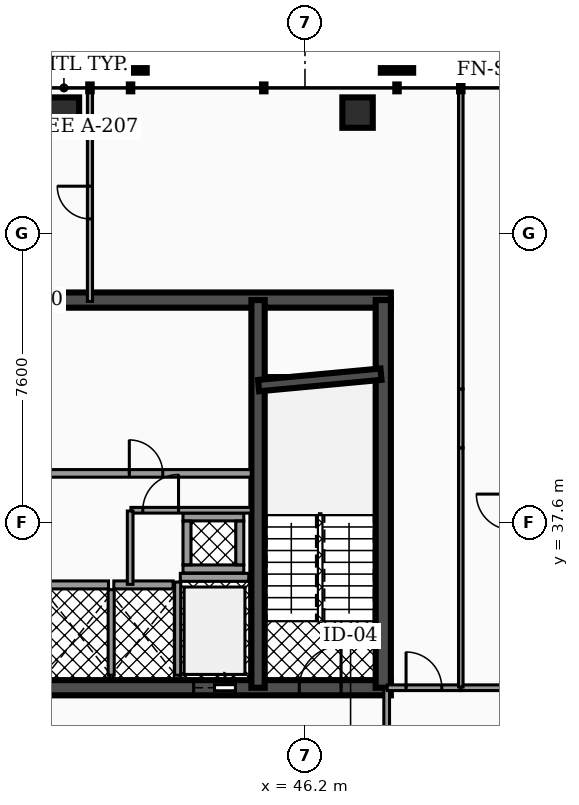
"""IFC4 building model, lengths in metres.
Left out: names, types, materials, properties, quantities, classifications, styles, units other than length and angle.
Written with IfcOpenShell. Run it as: python <this file> out.ifc"""

import sys

from ifc_helpers import new_model, si_unit, direction, frame, frame_2d, origin, origin_2d, place, context, subcontext, project, spatial, rectangle, hollow_rectangle, extrude, element, fill, save


model = new_model("IFC4")
c1 = context("Model", 3, precision=1e-05, world=origin(), true_north=direction((0.0, 1.0)))
c2 = subcontext(c1, "Body", "Model", "MODEL_VIEW")
j1 = project(units=[si_unit("LENGTHUNIT", "METRE"), si_unit("PLANEANGLEUNIT", "RADIAN")], contexts=[c1])
p1 = place(None, origin())
s1 = spatial("IfcSite", under=j1, at=p1, CompositionType="ELEMENT")
p2 = place(p1, origin())
s2 = spatial("IfcBuilding", under=s1, at=p2, CompositionType="ELEMENT")
p3 = place(p2, frame((0.0, 0.0, 153.34)))
s3 = spatial("IfcBuildingStorey", under=s2, at=p3, CompositionType="ELEMENT", Elevation=153.34)
p4 = place(p3, frame((28.4, 43.45, 0.0), z_axis=(0.0, 0.0, 1.0), x_axis=(1.0, 0.0, 0.0)))
e1 = element("IfcWall", 1, at=p4, inside=s3, PredefinedType="SHEAR", context=c2, shape_type="SweptSolid", body=[
    extrude(rectangle(XDim=20.06, YDim=0.4, at=frame_2d((10.03, 0.0))), origin(), (0.0, 0.0, 1.0), 3.5),
])
p5 = place(p3, frame((28.4, 33.25, 0.0), z_axis=(0.0, 0.0, 1.0), x_axis=(1.0, 0.0, 0.0)))
e2 = element("IfcWall", 2, at=p5, inside=s3, PredefinedType="SHEAR", context=c2, shape_type="SweptSolid", body=[
    extrude(rectangle(XDim=20.06, YDim=0.4, at=frame_2d((10.03, 0.0))), origin(), (0.0, 0.0, 1.0), 3.5),
])
p6 = place(p5, frame((4.03, 0.0, 0.0)))
e3 = element("IfcOpeningElement", 3, at=p6, cuts=e2, PredefinedType="OPENING", context=c2, shape_type="SweptSolid", body=[
    extrude(rectangle(XDim=1.1, YDim=2.15, at=frame_2d((0.55, 1.075))), frame((0.0, 0.21, 0.0), z_axis=(0.0, -1.0, 0.0), x_axis=(1.0, 0.0, 0.0)), (0.0, 0.0, 1.0), 0.42),
])
p7 = place(p5, frame((14.87, 0.0, 0.0)))
e4 = element("IfcOpeningElement", 4, at=p7, cuts=e2, PredefinedType="OPENING", context=c2, shape_type="SweptSolid", body=[
    extrude(rectangle(XDim=1.1, YDim=2.15, at=frame_2d((0.55, 1.075))), frame((0.0, 0.21, 0.0), z_axis=(0.0, -1.0, 0.0), x_axis=(1.0, 0.0, 0.0)), (0.0, 0.0, 1.0), 0.42),
])
p8 = place(p5, frame((5.95, 0.0, 0.0)))
e5 = element("IfcOpeningElement", 5, at=p8, cuts=e2, PredefinedType="OPENING", context=c2, shape_type="SweptSolid", body=[
    extrude(rectangle(XDim=1.0, YDim=2.1, at=frame_2d((0.5, 1.05))), frame((0.0, 0.21, 0.0), z_axis=(0.0, -1.0, 0.0), x_axis=(1.0, 0.0, 0.0)), (0.0, 0.0, 1.0), 0.42),
])
p9 = place(p5, frame((7.65, 0.0, 0.0)))
e6 = element("IfcOpeningElement", 6, at=p9, cuts=e2, PredefinedType="OPENING", context=c2, shape_type="SweptSolid", body=[
    extrude(rectangle(XDim=1.0, YDim=2.1, at=frame_2d((0.5, 1.05))), frame((0.0, 0.21, 0.0), z_axis=(0.0, -1.0, 0.0), x_axis=(1.0, 0.0, 0.0)), (0.0, 0.0, 1.0), 0.42),
])
p10 = place(p5, frame((1.31, 0.0, 0.0)))
e7 = element("IfcOpeningElement", 7, at=p10, cuts=e2, PredefinedType="OPENING", context=c2, shape_type="SweptSolid", body=[
    extrude(rectangle(XDim=1.1, YDim=2.2, at=frame_2d((0.55, 1.1))), frame((0.0, 0.21, 0.0), z_axis=(0.0, -1.0, 0.0), x_axis=(1.0, 0.0, 0.0)), (0.0, 0.0, 1.0), 0.42),
])
p11 = place(p5, frame((9.44, 0.0, 0.0)))
e8 = element("IfcOpeningElement", 8, at=p11, cuts=e2, PredefinedType="OPENING", context=c2, shape_type="SweptSolid", body=[
    extrude(rectangle(XDim=1.12, YDim=2.05, at=frame_2d((0.56, 1.025))), frame((0.0, 0.21, 0.0), z_axis=(0.0, -1.0, 0.0), x_axis=(1.0, 0.0, 0.0)), (0.0, 0.0, 1.0), 0.42),
])
p12 = place(p5, frame((17.65, 0.0, 0.0)))
e9 = element("IfcOpeningElement", 9, at=p12, cuts=e2, PredefinedType="OPENING", context=c2, shape_type="SweptSolid", body=[
    extrude(rectangle(XDim=1.1, YDim=2.2, at=frame_2d((0.55, 1.1))), frame((0.0, 0.21, 0.0), z_axis=(0.0, -1.0, 0.0), x_axis=(1.0, 0.0, 0.0)), (0.0, 0.0, 1.0), 0.42),
])
p13 = place(p3, frame((44.965, 33.25, 0.0), z_axis=(0.0, 0.0, 1.0), x_axis=(0.0, 1.0, 0.0)))
e10 = element("IfcWall", 10, at=p13, inside=s3, PredefinedType="SHEAR", context=c2, shape_type="SweptSolid", body=[
    extrude(rectangle(XDim=10.2, YDim=0.35, at=frame_2d((5.1, 0.0))), origin(), (0.0, 0.0, 1.0), 3.5),
])
p14 = place(p3, frame((48.26, 33.25, 0.0), z_axis=(0.0, 0.0, 1.0), x_axis=(0.0, 1.0, 0.0)))
e11 = element("IfcWall", 11, at=p14, inside=s3, PredefinedType="SHEAR", context=c2, shape_type="SweptSolid", body=[
    extrude(rectangle(XDim=10.2, YDim=0.4, at=frame_2d((5.1, 0.0))), origin(), (0.0, 0.0, 1.0), 3.5),
])
p15 = place(p3, frame((44.98, 41.2, 0.0), z_axis=(0.0, 0.0, 1.0), x_axis=(0.995686468965, 0.09278176286, 0.0)))
e12 = element("IfcWall", 12, at=p15, inside=s3, PredefinedType="SHEAR", context=c2, shape_type="SweptSolid", body=[
    extrude(rectangle(XDim=3.234, YDim=0.3, at=frame_2d((1.617, 0.0))), origin(), (0.0, 0.0, 1.0), 3.5),
])
p16 = place(p3, frame((47.583, 48.383, 0.0), z_axis=(0.057932366005, -0.033363458976, 0.997762857885), x_axis=(0.499059487101, 0.866567728648, 0.0)))
e13 = element("IfcColumn", 13, at=p16, inside=s3, PredefinedType="COLUMN", context=c2, shape_type="SweptSolid", body=[
    extrude(hollow_rectangle(XDim=0.8, YDim=0.8, WallThickness=0.04, at=origin_2d()), origin(), (0.0, 0.0, 1.0), 3.498),
])
p17 = place(p3, frame((39.857, 48.383, 0.0), z_axis=(-0.007830290744, -0.033418562283, 0.999410769525), x_axis=(0.973630450451, -0.228130984206, 0.0)))
e14 = element("IfcColumn", 14, at=p17, inside=s3, PredefinedType="COLUMN", context=c2, shape_type="SweptSolid", body=[
    extrude(hollow_rectangle(XDim=0.8, YDim=0.8, WallThickness=0.04, at=origin_2d()), origin(), (0.0, 0.0, 1.0), 3.492),
])
p18 = place(p3, frame((42.92, 36.155, 0.0), z_axis=(0.0, 0.0, 1.0), x_axis=(1.0, 0.0, 0.0)))
e15 = element("IfcWall", 15, at=p18, inside=s3, PredefinedType="SOLIDWALL", context=c2, shape_type="SweptSolid", body=[
    extrude(rectangle(XDim=1.8, YDim=0.21, at=frame_2d((0.9, 0.0))), origin(), (0.0, 0.0, 1.0), 2.472),
])
p19 = place(p3, frame((42.85, 33.58, 0.0), z_axis=(0.0, 0.0, 1.0), x_axis=(0.0, 1.0, 0.0)))
e16 = element("IfcWall", 16, at=p19, inside=s3, PredefinedType="SOLIDWALL", context=c2, shape_type="SweptSolid", body=[
    extrude(rectangle(XDim=2.45, YDim=0.16, at=frame_2d((1.225, 0.0))), origin(), (0.0, 0.0, 1.0), 2.472),
])
p20 = place(p3, frame((39.47, 35.955, 0.0), z_axis=(0.0, 0.0, 1.0), x_axis=(1.0, 0.0, 0.0)))
e17 = element("IfcWall", 17, at=p20, inside=s3, PredefinedType="SOLIDWALL", context=c2, shape_type="SweptSolid", body=[
    extrude(rectangle(XDim=1.56, YDim=0.21, at=frame_2d((0.78, 0.0))), origin(), (0.0, 0.0, 1.0), 2.472),
])
p21 = place(p3, frame((41.1, 33.58, 0.0), z_axis=(0.0, 0.0, 1.0), x_axis=(0.0, 1.0, 0.0)))
e18 = element("IfcWall", 18, at=p21, inside=s3, PredefinedType="SOLIDWALL", context=c2, shape_type="SweptSolid", body=[
    extrude(rectangle(XDim=2.25, YDim=0.16, at=frame_2d((1.125, 0.0))), origin(), (0.0, 0.0, 1.0), 2.472),
])
p22 = place(p3, frame((41.17, 35.955, 0.0), z_axis=(0.0, 0.0, 1.0), x_axis=(1.0, 0.0, 0.0)))
e19 = element("IfcWall", 19, at=p22, inside=s3, PredefinedType="SOLIDWALL", context=c2, shape_type="SweptSolid", body=[
    extrude(rectangle(XDim=1.56, YDim=0.21, at=frame_2d((0.78, 0.0))), origin(), (0.0, 0.0, 1.0), 2.472),
])
for number, where, z_axis, x_axis in (
    (20, (42.99, 36.375, 0.0), (0.0, 0.0, 1.0), (1.0, 0.0, 0.0)),
    (21, (42.99, 37.745, 0.0), (0.0, 0.0, 1.0), (1.0, 0.0, 0.0)),
):
    element("IfcWall", number, at=place(p3, frame(where, z_axis=z_axis, x_axis=x_axis)), inside=s3, PredefinedType="SOLIDWALL", context=c2, shape_type="SweptSolid", body=[
        extrude(rectangle(XDim=1.6, YDim=0.21, at=frame_2d((0.8, 0.0))), origin(), (0.0, 0.0, 1.0), 3.5),
    ])
for number, where, z_axis, x_axis in (
    (22, (43.095, 36.485, 0.0), (0.0, 0.0, 1.0), (0.0, 1.0, 0.0)),
    (23, (44.485, 36.485, 0.0), (0.0, 0.0, 1.0), (0.0, 1.0, 0.0)),
):
    element("IfcWall", number, at=place(p3, frame(where, z_axis=z_axis, x_axis=x_axis)), inside=s3, PredefinedType="SOLIDWALL", context=c2, shape_type="SweptSolid", body=[
        extrude(rectangle(XDim=1.15, YDim=0.21, at=frame_2d((0.575, 0.0))), origin(), (0.0, 0.0, 1.0), 3.5),
    ])
p23 = place(p3, frame((39.25, 38.89, 0.0), z_axis=(0.0, 0.0, 1.0), x_axis=(1.0, 0.0, 0.0)))
e24 = element("IfcWall", 24, at=p23, inside=s3, PredefinedType="PARTITIONING", context=c2, shape_type="SweptSolid", body=[
    extrude(rectangle(XDim=5.535, YDim=0.2, at=frame_2d((2.768, 0.0))), origin(), (0.0, 0.0, 1.0), 2.447),
])
p24 = place(p23, frame((2.327, 0.0, 0.0)))
e25 = element("IfcOpeningElement", 25, at=p24, cuts=e24, PredefinedType="OPENING", context=c2, shape_type="SweptSolid", body=[
    extrude(rectangle(XDim=0.88, YDim=2.05, at=frame_2d((0.44, 1.025))), frame((0.0, 0.11, 0.0), z_axis=(0.0, -1.0, 0.0), x_axis=(1.0, 0.0, 0.0)), (0.0, 0.0, 1.0), 0.22),
])
p25 = place(p3, frame((41.62, 37.92, 0.0), z_axis=(0.0, 0.0, 1.0), x_axis=(1.0, 0.0, 0.0)))
e26 = element("IfcWall", 26, at=p25, inside=s3, PredefinedType="PARTITIONING", context=c2, shape_type="SweptSolid", body=[
    extrude(rectangle(XDim=3.165, YDim=0.15, at=frame_2d((1.583, 0.0))), origin(), (0.0, 0.0, 1.0), 2.447),
])
p26 = place(p25, frame((0.312, 0.0, 0.0)))
e27 = element("IfcOpeningElement", 27, at=p26, cuts=e26, PredefinedType="OPENING", context=c2, shape_type="SweptSolid", body=[
    extrude(rectangle(XDim=0.94, YDim=2.05, at=frame_2d((0.47, 1.025))), frame((0.0, 0.085, 0.0), z_axis=(0.0, -1.0, 0.0), x_axis=(1.0, 0.0, 0.0)), (0.0, 0.0, 1.0), 0.17),
])
p27 = place(p3, frame((41.6, 35.97, 0.0), z_axis=(0.0, 0.0, 1.0), x_axis=(0.0, 1.0, 0.0)))
e28 = element("IfcWall", 28, at=p27, inside=s3, PredefinedType="PARTITIONING", context=c2, shape_type="SweptSolid", body=[
    extrude(rectangle(XDim=1.93, YDim=0.15, at=frame_2d((0.965, 0.0))), origin(), (0.0, 0.0, 1.0), 2.447),
])
p28 = place(p3, frame((48.35, 30.17, 0.0), z_axis=(0.0, 0.0, 1.0), x_axis=(0.0, 1.0, 0.0)))
e29 = element("IfcWall", 29, at=p28, inside=s3, PredefinedType="PARTITIONING", context=c2, shape_type="SweptSolid", body=[
    extrude(rectangle(XDim=3.06, YDim=0.15, at=frame_2d((1.53, 0.0))), origin(), (0.0, 0.0, 1.0), 2.447),
])
p29 = place(p28, frame((1.06, 0.0, 0.0)))
e30 = element("IfcOpeningElement", 30, at=p29, cuts=e29, PredefinedType="OPENING", context=c2, shape_type="SweptSolid", body=[
    extrude(rectangle(XDim=0.94, YDim=2.05, at=frame_2d((0.47, 1.025))), frame((0.0, 0.085, 0.0), z_axis=(0.0, -1.0, 0.0), x_axis=(1.0, 0.0, 0.0)), (0.0, 0.0, 1.0), 0.17),
])
p30 = place(p3, frame((50.305, 33.25, 0.0), z_axis=(0.0, 0.0, 1.0), x_axis=(1.0, 0.0, 0.0)))
e31 = element("IfcWall", 31, at=p30, inside=s3, PredefinedType="PARTITIONING", context=c2, shape_type="SweptSolid", body=[
    extrude(rectangle(XDim=1.325, YDim=0.15, at=frame_2d((0.663, 0.0))), origin(), (0.0, 0.0, 1.0), 2.447),
])
p31 = place(p3, frame((48.365, 33.25, 0.0), z_axis=(0.0, 0.0, 1.0), x_axis=(1.0, 0.0, 0.0)))
e32 = element("IfcWall", 32, at=p31, inside=s3, PredefinedType="PARTITIONING", context=c2, shape_type="SweptSolid", body=[
    extrude(rectangle(XDim=1.93, YDim=0.15, at=frame_2d((0.965, 0.0))), origin(), (0.0, 0.0, 1.0), 2.447),
])
p32 = place(p31, frame((0.495, 0.0, 0.0)))
e33 = element("IfcOpeningElement", 33, at=p32, cuts=e32, PredefinedType="OPENING", context=c2, shape_type="SweptSolid", body=[
    extrude(rectangle(XDim=0.94, YDim=2.05, at=frame_2d((0.47, 1.025))), frame((0.0, 0.085, 0.0), z_axis=(0.0, -1.0, 0.0), x_axis=(1.0, 0.0, 0.0)), (0.0, 0.0, 1.0), 0.17),
])
p33 = place(p3, frame((50.3, 33.27, 0.0), z_axis=(0.0, 0.0, 1.0), x_axis=(0.0, 1.0, 0.0)))
e34 = element("IfcWall", 34, at=p33, inside=s3, PredefinedType="PARTITIONING", context=c2, shape_type="SweptSolid", body=[
    extrude(rectangle(XDim=6.292, YDim=0.12, at=frame_2d((3.146, 0.0))), origin(), (0.0, 0.0, 1.0), 2.447),
])
p34 = place(p3, frame((50.3, 39.562, 0.0), z_axis=(0.0, 0.0, 1.0), x_axis=(0.0, 1.0, 0.0)))
e35 = element("IfcWall", 35, at=p34, inside=s3, PredefinedType="PARTITIONING", context=c2, shape_type="SweptSolid", body=[
    extrude(rectangle(XDim=1.55, YDim=0.12, at=frame_2d((0.775, 0.0))), origin(), (0.0, 0.0, 1.0), 2.447),
])
p35 = place(p3, frame((50.3, 41.112, 0.0), z_axis=(0.0, 0.0, 1.0), x_axis=(0.0, 1.0, 0.0)))
e36 = element("IfcWall", 36, at=p35, inside=s3, PredefinedType="PARTITIONING", context=c2, shape_type="SweptSolid", body=[
    extrude(rectangle(XDim=7.907, YDim=0.12, at=frame_2d((3.953, 0.0))), origin(), (0.0, 0.0, 1.0), 2.447),
])
p36 = place(p3, frame((40.542, 43.415, 0.0), z_axis=(0.0, 0.0, 1.0), x_axis=(0.0, 1.0, 0.0)))
e37 = element("IfcWall", 37, at=p36, inside=s3, PredefinedType="PARTITIONING", context=c2, shape_type="SweptSolid", body=[
    extrude(rectangle(XDim=5.603, YDim=0.135, at=frame_2d((2.802, 0.0))), origin(), (0.0, 0.0, 1.0), 2.447),
])
p37 = place(p36, frame((2.172, 0.0, 0.0)))
e38 = element("IfcOpeningElement", 38, at=p37, cuts=e37, PredefinedType="OPENING", context=c2, shape_type="SweptSolid", body=[
    extrude(rectangle(XDim=0.86, YDim=2.05, at=frame_2d((0.43, 1.025))), frame((0.0, 0.077, 0.0), z_axis=(0.0, -1.0, 0.0), x_axis=(1.0, 0.0, 0.0)), (0.0, 0.0, 1.0), 0.155),
])
p38 = place(p7, origin())
e39 = element("IfcDoor", 39, at=p38, inside=s3, OperationType="SLIDING_TO_RIGHT", PredefinedType="DOOR", context=c2, shape_type="SweptSolid", body=[
    extrude(rectangle(XDim=1.1, YDim=2.15, at=frame_2d((0.55, 1.075))), frame((0.0, 0.025, 0.0), z_axis=(0.0, -1.0, 0.0), x_axis=(1.0, 0.0, 0.0)), (0.0, 0.0, 1.0), 0.05),
])
fill(e4, e39)
p39 = place(p12, origin())
e40 = element("IfcDoor", 40, at=p39, inside=s3, OperationType="SINGLE_SWING_RIGHT", PredefinedType="DOOR", context=c2, shape_type="SweptSolid", body=[
    extrude(rectangle(XDim=1.1, YDim=2.2, at=frame_2d((0.55, 1.1))), frame((0.0, 0.025, 0.0), z_axis=(0.0, -1.0, 0.0), x_axis=(1.0, 0.0, 0.0)), (0.0, 0.0, 1.0), 0.05),
])
fill(e9, e40)
p40 = place(p24, origin())
e41 = element("IfcDoor", 41, at=p40, inside=s3, OperationType="SINGLE_SWING_LEFT", PredefinedType="DOOR", context=c2, shape_type="SweptSolid", body=[
    extrude(rectangle(XDim=0.88, YDim=2.05, at=frame_2d((0.44, 1.025))), frame((0.0, 0.025, 0.0), z_axis=(0.0, -1.0, 0.0), x_axis=(1.0, 0.0, 0.0)), (0.0, 0.0, 1.0), 0.05),
])
fill(e25, e41)
p41 = place(p26, origin())
e42 = element("IfcDoor", 42, at=p41, inside=s3, OperationType="SINGLE_SWING_RIGHT", PredefinedType="DOOR", context=c2, shape_type="SweptSolid", body=[
    extrude(rectangle(XDim=0.94, YDim=2.05, at=frame_2d((0.47, 1.025))), frame((0.0, 0.025, 0.0), z_axis=(0.0, -1.0, 0.0), x_axis=(1.0, 0.0, 0.0)), (0.0, 0.0, 1.0), 0.05),
])
fill(e27, e42)
p42 = place(p32, origin())
e43 = element("IfcDoor", 43, at=p42, inside=s3, OperationType="SINGLE_SWING_LEFT", PredefinedType="DOOR", context=c2, shape_type="SweptSolid", body=[
    extrude(rectangle(XDim=0.94, YDim=2.05, at=frame_2d((0.47, 1.025))), frame((0.0, 0.025, 0.0), z_axis=(0.0, -1.0, 0.0), x_axis=(1.0, 0.0, 0.0)), (0.0, 0.0, 1.0), 0.05),
])
fill(e33, e43)
p43 = place(p37, origin())
e44 = element("IfcDoor", 44, at=p43, inside=s3, OperationType="SINGLE_SWING_RIGHT", PredefinedType="DOOR", context=c2, shape_type="SweptSolid", body=[
    extrude(rectangle(XDim=0.86, YDim=2.05, at=frame_2d((0.43, 1.025))), frame((0.0, 0.025, 0.0), z_axis=(0.0, -1.0, 0.0), x_axis=(1.0, 0.0, 0.0)), (0.0, 0.0, 1.0), 0.05),
])
fill(e38, e44)
save(model, sys.argv[1])
